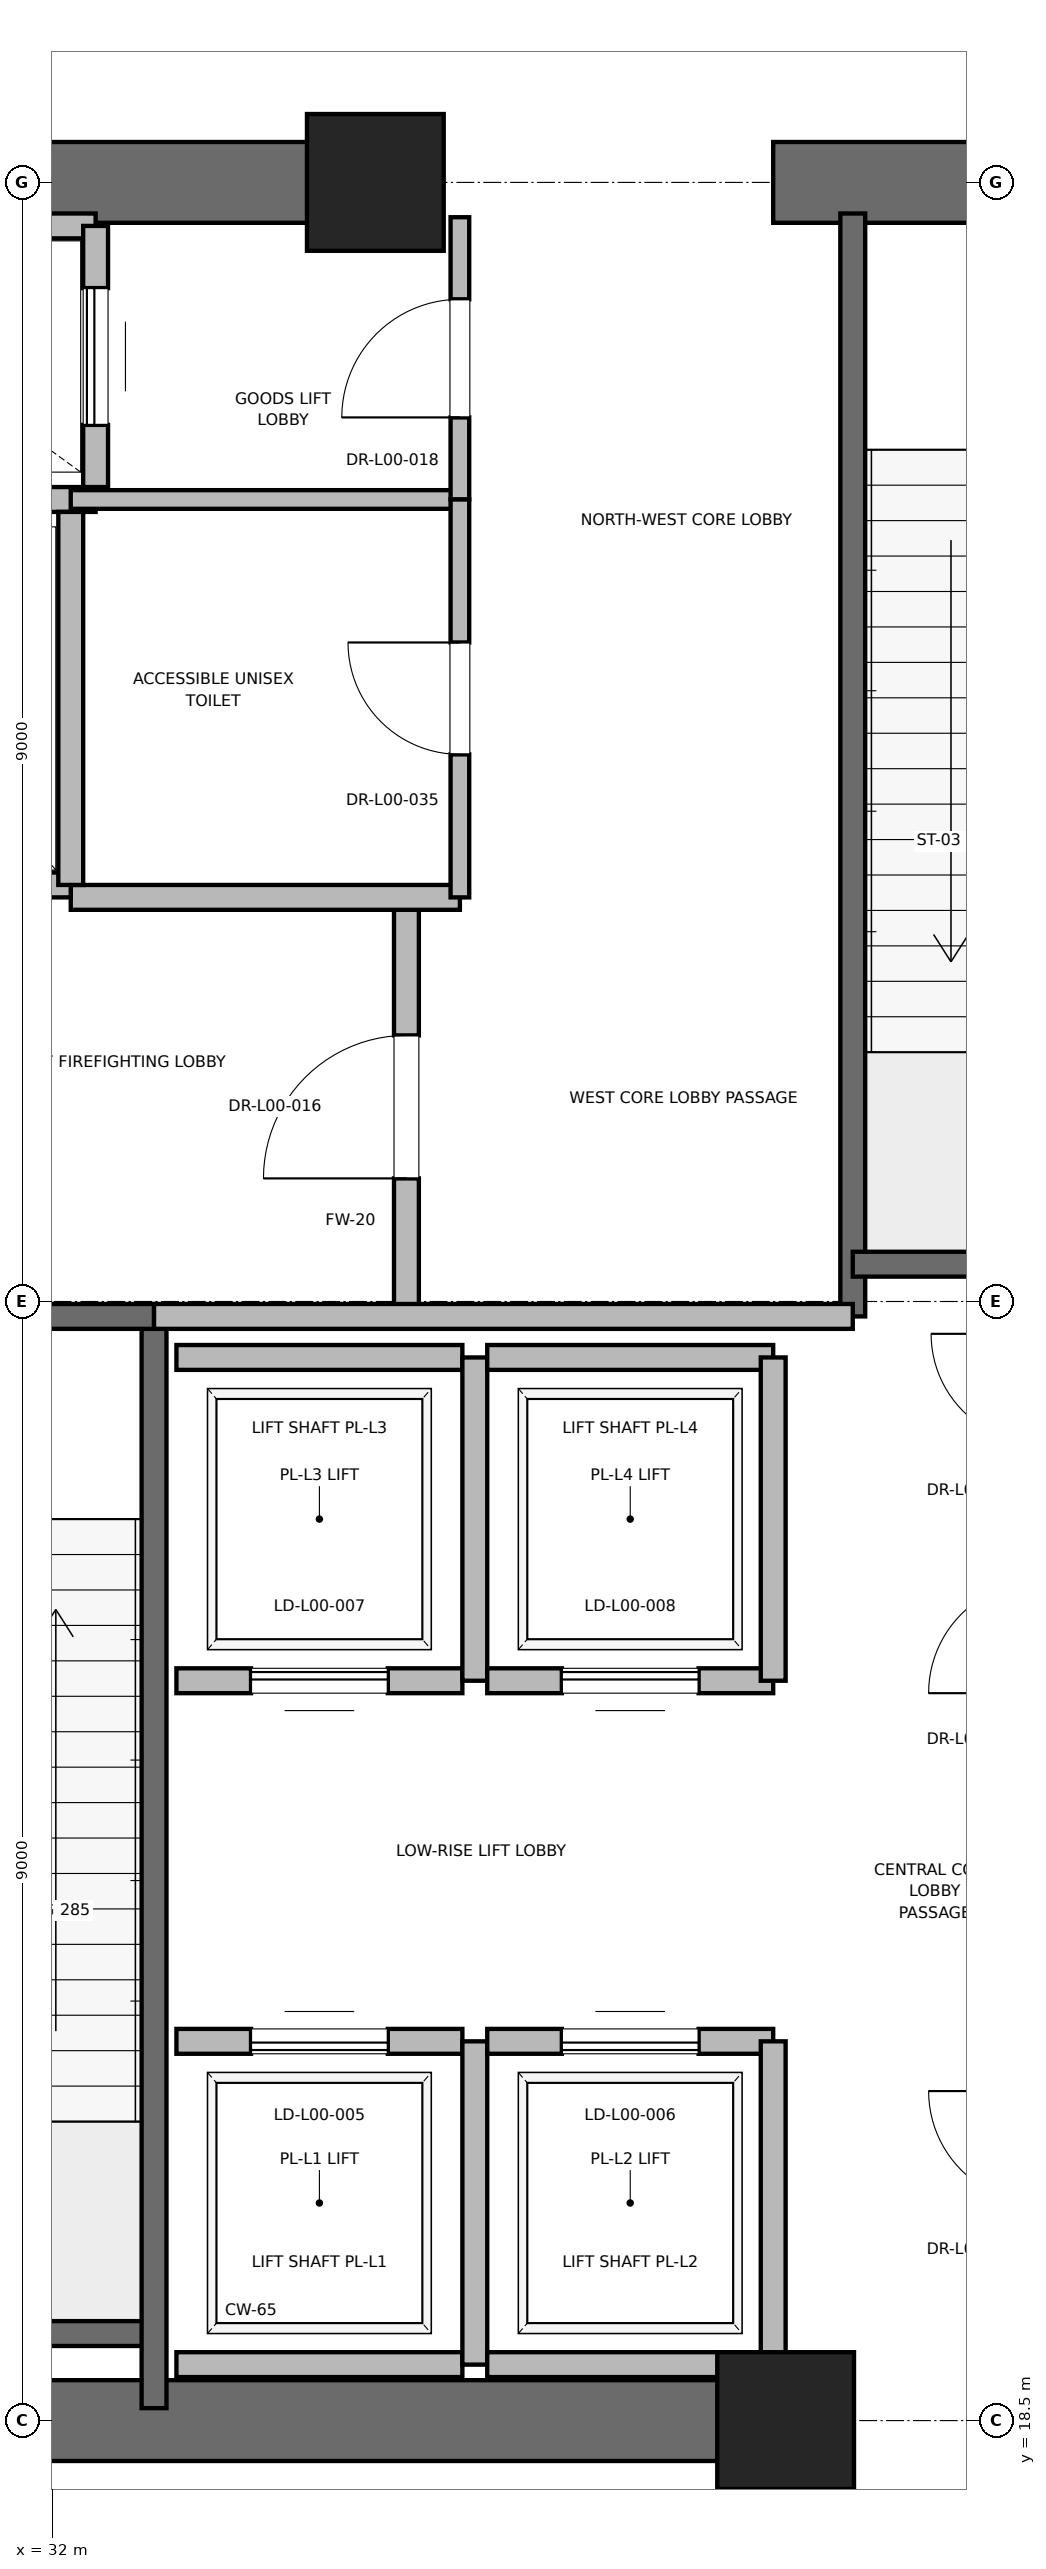
"""IFC4 building model, lengths in metres.
Left out: names, types, materials, properties, quantities, classifications, styles, units other than length and angle.
Written with IfcOpenShell. Run it as: python <this file> out.ifc"""

import sys

from ifc_helpers import new_model, si_unit, direction, frame, frame_2d, origin, origin_2d, place, context, subcontext, project, spatial, rectangle, extrude, element, fill, save


model = new_model("IFC4")
c1 = context("Model", 3, precision=1e-05, world=origin(), true_north=direction((0.0, 1.0)))
c2 = subcontext(c1, "Body", "Model", "MODEL_VIEW")
j1 = project(units=[si_unit("LENGTHUNIT", "METRE"), si_unit("PLANEANGLEUNIT", "RADIAN")], contexts=[c1])
p1 = place(None, origin())
s1 = spatial("IfcSite", under=j1, at=p1, CompositionType="ELEMENT")
p2 = place(p1, origin())
s2 = spatial("IfcBuilding", under=s1, at=p2, CompositionType="ELEMENT")
p3 = place(p2, origin())
s3 = spatial("IfcBuildingStorey", under=s2, at=p3, CompositionType="ELEMENT", Elevation=0.0)
for number, where, z_axis, x_axis in (
    (1, (37.9, 18.5, 0.0), (0.0, 0.0, 1.0), (1.0, 0.0, 0.0)),
    (2, (34.6, 36.5, 0.0), (0.0, 0.0, 1.0), (1.0, 0.0, 0.0)),
):
    element("IfcColumn", number, at=place(p3, frame(where, z_axis=z_axis, x_axis=x_axis)), inside=s3, PredefinedType="PILASTER", context=c2, shape_type="SweptSolid", body=[
        extrude(rectangle(XDim=1.1, YDim=1.1, at=origin_2d()), origin(), (0.0, 0.0, 1.0), 6.0),
    ])
p4 = place(p3, frame((29.0, 18.5, 0.0), z_axis=(0.0, 0.0, 1.0), x_axis=(1.0, 0.0, 0.0)))
e3 = element("IfcWall", 3, at=p4, inside=s3, PredefinedType="SHEAR", context=c2, shape_type="SweptSolid", body=[
    extrude(rectangle(XDim=9.2, YDim=0.65, at=frame_2d((4.6, 0.0))), origin(), (0.0, 0.0, 1.0), 5.72),
])
p5 = place(p3, frame((29.0, 36.5, 0.0), z_axis=(0.0, 0.0, 1.0), x_axis=(1.0, 0.0, 0.0)))
e4 = element("IfcWall", 4, at=p5, inside=s3, PredefinedType="SHEAR", context=c2, shape_type="SweptSolid", body=[
    extrude(rectangle(XDim=5.8, YDim=0.65, at=frame_2d((2.9, 0.0))), origin(), (0.0, 0.0, 1.0), 5.72),
])
p6 = place(p3, frame((37.8, 36.5, 0.0), z_axis=(0.0, 0.0, 1.0), x_axis=(1.0, 0.0, 0.0)))
e5 = element("IfcWall", 5, at=p6, inside=s3, PredefinedType="SHEAR", context=c2, shape_type="SweptSolid", body=[
    extrude(rectangle(XDim=4.4, YDim=0.65, at=frame_2d((2.2, 0.0))), origin(), (0.0, 0.0, 1.0), 5.72),
])
p7 = place(p6, frame((1.65, 0.0, 0.0)))
e6 = element("IfcOpeningElement", 6, at=p7, cuts=e5, PredefinedType="OPENING", context=c2, shape_type="SweptSolid", body=[
    extrude(rectangle(XDim=1.1, YDim=2.15, at=frame_2d((0.55, 1.075))), frame((0.0, 0.325, 0.0), z_axis=(0.0, -1.0, 0.0), x_axis=(1.0, 0.0, 0.0)), (0.0, 0.0, 1.0), 0.65),
])
p8 = place(p3, frame((29.7, 19.2, 0.0), z_axis=(0.0, 0.0, 1.0), x_axis=(1.0, 0.0, 0.0)))
e7 = element("IfcWall", 7, at=p8, inside=s3, PredefinedType="SOLIDWALL", context=c2, shape_type="SweptSolid", body=[
    extrude(rectangle(XDim=3.12, YDim=0.2, at=frame_2d((1.56, 0.0))), origin(), (0.0, 0.0, 1.0), 5.72),
])
p9 = place(p3, frame((32.82, 18.6, 0.0), z_axis=(0.0, 0.0, 1.0), x_axis=(0.0, 1.0, 0.0)))
e8 = element("IfcWall", 8, at=p9, inside=s3, PredefinedType="SOLIDWALL", context=c2, shape_type="SweptSolid", body=[
    extrude(rectangle(XDim=8.78, YDim=0.2, at=frame_2d((4.39, 0.0))), origin(), (0.0, 0.0, 1.0), 5.72),
])
p10 = place(p3, frame((29.7, 27.38, 0.0), z_axis=(0.0, 0.0, 1.0), x_axis=(1.0, 0.0, 0.0)))
e9 = element("IfcWall", 9, at=p10, inside=s3, PredefinedType="SOLIDWALL", context=c2, shape_type="SweptSolid", body=[
    extrude(rectangle(XDim=3.12, YDim=0.2, at=frame_2d((1.56, 0.0))), origin(), (0.0, 0.0, 1.0), 5.72),
])
p11 = place(p10, frame((1.01, 0.0, 0.0)))
e10 = element("IfcOpeningElement", 10, at=p11, cuts=e9, PredefinedType="OPENING", context=c2, shape_type="SweptSolid", body=[
    extrude(rectangle(XDim=1.1, YDim=2.15, at=frame_2d((0.55, 1.075))), frame((0.0, 0.1, 0.0), z_axis=(0.0, -1.0, 0.0), x_axis=(1.0, 0.0, 0.0)), (0.0, 0.0, 1.0), 0.2),
])
p12 = place(p3, frame((38.44, 27.38, 0.0), z_axis=(0.0, 0.0, 1.0), x_axis=(0.0, 1.0, 0.0)))
e11 = element("IfcWall", 11, at=p12, inside=s3, PredefinedType="SOLIDWALL", context=c2, shape_type="SweptSolid", body=[
    extrude(rectangle(XDim=8.87, YDim=0.2, at=frame_2d((4.435, 0.0))), origin(), (0.0, 0.0, 1.0), 5.72),
])
p13 = place(p3, frame((38.44, 27.8, 0.0), z_axis=(0.0, 0.0, 1.0), x_axis=(1.0, 0.0, 0.0)))
e12 = element("IfcWall", 12, at=p13, inside=s3, PredefinedType="SOLIDWALL", context=c2, shape_type="SweptSolid", body=[
    extrude(rectangle(XDim=3.32, YDim=0.2, at=frame_2d((1.66, 0.0))), origin(), (0.0, 0.0, 1.0), 5.72),
])
p14 = place(p3, frame((34.85, 27.38, 0.0), z_axis=(0.0, 0.0, 1.0), x_axis=(0.0, 1.0, 0.0)))
e13 = element("IfcWall", 13, at=p14, inside=s3, PredefinedType="PARTITIONING", context=c2, shape_type="SweptSolid", body=[
    extrude(rectangle(XDim=3.37, YDim=0.2, at=frame_2d((1.685, 0.0))), origin(), (0.0, 0.0, 1.0), 5.72),
])
p15 = place(p14, frame((1.11, 0.0, 0.0)))
e14 = element("IfcOpeningElement", 14, at=p15, cuts=e13, PredefinedType="OPENING", context=c2, shape_type="SweptSolid", body=[
    extrude(rectangle(XDim=1.15, YDim=2.2, at=frame_2d((0.575, 1.1))), frame((0.0, 0.1, 0.0), z_axis=(0.0, -1.0, 0.0), x_axis=(1.0, 0.0, 0.0)), (0.0, 0.0, 1.0), 0.2),
])
p16 = place(p3, frame((32.82, 27.38, 0.0), z_axis=(0.0, 0.0, 1.0), x_axis=(1.0, 0.0, 0.0)))
e15 = element("IfcWall", 15, at=p16, inside=s3, PredefinedType="PARTITIONING", context=c2, shape_type="SweptSolid", body=[
    extrude(rectangle(XDim=5.62, YDim=0.2, at=frame_2d((2.81, 0.0))), origin(), (0.0, 0.0, 1.0), 5.72),
])
p17 = place(p3, frame((32.15, 30.75, 0.0), z_axis=(0.0, 0.0, 1.0), x_axis=(1.0, 0.0, 0.0)))
e16 = element("IfcWall", 16, at=p17, inside=s3, PredefinedType="PARTITIONING", context=c2, shape_type="SweptSolid", body=[
    extrude(rectangle(XDim=3.13, YDim=0.2, at=frame_2d((1.565, 0.0))), origin(), (0.0, 0.0, 1.0), 5.72),
])
p18 = place(p3, frame((29.55, 30.85, 0.0), z_axis=(0.0, 0.0, 1.0), x_axis=(1.0, 0.0, 0.0)))
e17 = element("IfcWall", 17, at=p18, inside=s3, PredefinedType="SOLIDWALL", context=c2, shape_type="SweptSolid", body=[
    extrude(rectangle(XDim=2.6, YDim=0.2, at=frame_2d((1.3, 0.0))), origin(), (0.0, 0.0, 1.0), 4.5),
])
p19 = place(p18, frame((0.75, 0.0, 0.0)))
e18 = element("IfcOpeningElement", 18, at=p19, cuts=e17, PredefinedType="OPENING", context=c2, shape_type="SweptSolid", body=[
    extrude(rectangle(XDim=1.1, YDim=2.2, at=frame_2d((0.55, 1.1))), frame((0.0, 0.1, 0.0), z_axis=(0.0, -1.0, 0.0), x_axis=(1.0, 0.0, 0.0)), (0.0, 0.0, 1.0), 0.2),
])
p20 = place(p3, frame((29.55, 33.95, 0.0), z_axis=(0.0, 0.0, 1.0), x_axis=(1.0, 0.0, 0.0)))
e19 = element("IfcWall", 19, at=p20, inside=s3, PredefinedType="SOLIDWALL", context=c2, shape_type="SweptSolid", body=[
    extrude(rectangle(XDim=2.8, YDim=0.2, at=frame_2d((1.4, 0.0))), origin(), (0.0, 0.0, 1.0), 5.72),
])
p21 = place(p3, frame((32.15, 30.85, 0.0), z_axis=(0.0, 0.0, 1.0), x_axis=(0.0, 1.0, 0.0)))
e20 = element("IfcWall", 20, at=p21, inside=s3, PredefinedType="SOLIDWALL", context=c2, shape_type="SweptSolid", body=[
    extrude(rectangle(XDim=3.0, YDim=0.2, at=frame_2d((1.5, 0.0))), origin(), (0.0, 0.0, 1.0), 5.72),
])
p22 = place(p3, frame((32.35, 36.15, 0.0), z_axis=(0.0, 0.0, 1.0), x_axis=(-1.0, 0.0, 0.0)))
e21 = element("IfcWall", 21, at=p22, inside=s3, PredefinedType="SOLIDWALL", context=c2, shape_type="SweptSolid", body=[
    extrude(rectangle(XDim=2.8, YDim=0.2, at=frame_2d((1.4, 0.0))), origin(), (0.0, 0.0, 1.0), 4.779),
])
p23 = place(p3, frame((32.35, 34.05, 0.0), z_axis=(0.0, 0.0, 1.0), x_axis=(0.0, 1.0, 0.0)))
e22 = element("IfcWall", 22, at=p23, inside=s3, PredefinedType="SOLIDWALL", context=c2, shape_type="SweptSolid", body=[
    extrude(rectangle(XDim=2.1, YDim=0.2, at=frame_2d((1.05, 0.0))), origin(), (0.0, 0.0, 1.0), 5.72),
])
p24 = place(p23, frame((0.5, 0.0, 0.0)))
e23 = element("IfcOpeningElement", 23, at=p24, cuts=e22, PredefinedType="OPENING", context=c2, shape_type="SweptSolid", body=[
    extrude(rectangle(XDim=1.1, YDim=2.2, at=frame_2d((0.55, 1.1))), frame((0.0, 0.1, 0.0), z_axis=(0.0, -1.0, 0.0), x_axis=(1.0, 0.0, 0.0)), (0.0, 0.0, 1.0), 0.2),
])
p25 = place(p3, frame((33.0, 18.95, 0.0), z_axis=(0.0, 0.0, 1.0), x_axis=(1.0, 0.0, 0.0)))
e24 = element("IfcWall", 24, at=p25, inside=s3, PredefinedType="SOLIDWALL", context=c2, shape_type="SweptSolid", body=[
    extrude(rectangle(XDim=2.3, YDim=0.2, at=frame_2d((1.15, 0.0))), origin(), (0.0, 0.0, 1.0), 5.72),
])
p26 = place(p3, frame((35.3, 21.55, 0.0), z_axis=(0.0, 0.0, 1.0), x_axis=(-1.0, 0.0, 0.0)))
e25 = element("IfcWall", 25, at=p26, inside=s3, PredefinedType="SOLIDWALL", context=c2, shape_type="SweptSolid", body=[
    extrude(rectangle(XDim=2.3, YDim=0.2, at=frame_2d((1.15, 0.0))), origin(), (0.0, 0.0, 1.0), 5.72),
])
p27 = place(p26, frame((0.6, 0.0, 0.0)))
e26 = element("IfcOpeningElement", 26, at=p27, cuts=e25, PredefinedType="OPENING", context=c2, shape_type="SweptSolid", body=[
    extrude(rectangle(XDim=1.1, YDim=2.2, at=frame_2d((0.55, 1.1))), frame((0.0, 0.1, 0.0), z_axis=(0.0, -1.0, 0.0), x_axis=(1.0, 0.0, 0.0)), (0.0, 0.0, 1.0), 0.2),
])
p28 = place(p3, frame((35.4, 18.95, 0.0), z_axis=(0.0, 0.0, 1.0), x_axis=(0.0, 1.0, 0.0)))
e27 = element("IfcWall", 27, at=p28, inside=s3, PredefinedType="SOLIDWALL", context=c2, shape_type="SweptSolid", body=[
    extrude(rectangle(XDim=2.6, YDim=0.2, at=frame_2d((1.3, 0.0))), origin(), (0.0, 0.0, 1.0), 5.72),
])
p29 = place(p3, frame((35.5, 18.95, 0.0), z_axis=(0.0, 0.0, 1.0), x_axis=(1.0, 0.0, 0.0)))
e28 = element("IfcWall", 28, at=p29, inside=s3, PredefinedType="SOLIDWALL", context=c2, shape_type="SweptSolid", body=[
    extrude(rectangle(XDim=2.3, YDim=0.2, at=frame_2d((1.15, 0.0))), origin(), (0.0, 0.0, 1.0), 4.5),
])
p30 = place(p3, frame((37.8, 21.55, 0.0), z_axis=(0.0, 0.0, 1.0), x_axis=(-1.0, 0.0, 0.0)))
e29 = element("IfcWall", 29, at=p30, inside=s3, PredefinedType="SOLIDWALL", context=c2, shape_type="SweptSolid", body=[
    extrude(rectangle(XDim=2.3, YDim=0.2, at=frame_2d((1.15, 0.0))), origin(), (0.0, 0.0, 1.0), 5.72),
])
p31 = place(p30, frame((0.6, 0.0, 0.0)))
e30 = element("IfcOpeningElement", 30, at=p31, cuts=e29, PredefinedType="OPENING", context=c2, shape_type="SweptSolid", body=[
    extrude(rectangle(XDim=1.1, YDim=2.2, at=frame_2d((0.55, 1.1))), frame((0.0, 0.1, 0.0), z_axis=(0.0, -1.0, 0.0), x_axis=(1.0, 0.0, 0.0)), (0.0, 0.0, 1.0), 0.2),
])
p32 = place(p3, frame((37.8, 18.95, 0.0), z_axis=(0.0, 0.0, 1.0), x_axis=(0.0, 1.0, 0.0)))
e31 = element("IfcWall", 31, at=p32, inside=s3, PredefinedType="SOLIDWALL", context=c2, shape_type="SweptSolid", body=[
    extrude(rectangle(XDim=2.6, YDim=0.2, at=frame_2d((1.3, 0.0))), origin(), (0.0, 0.0, 1.0), 4.5),
])
p33 = place(p3, frame((33.0, 24.45, 0.0), z_axis=(0.0, 0.0, 1.0), x_axis=(1.0, 0.0, 0.0)))
e32 = element("IfcWall", 32, at=p33, inside=s3, PredefinedType="SOLIDWALL", context=c2, shape_type="SweptSolid", body=[
    extrude(rectangle(XDim=2.3, YDim=0.2, at=frame_2d((1.15, 0.0))), origin(), (0.0, 0.0, 1.0), 5.72),
])
p34 = place(p33, frame((0.6, 0.0, 0.0)))
e33 = element("IfcOpeningElement", 33, at=p34, cuts=e32, PredefinedType="OPENING", context=c2, shape_type="SweptSolid", body=[
    extrude(rectangle(XDim=1.1, YDim=2.2, at=frame_2d((0.55, 1.1))), frame((0.0, 0.1, 0.0), z_axis=(0.0, -1.0, 0.0), x_axis=(1.0, 0.0, 0.0)), (0.0, 0.0, 1.0), 0.2),
])
p35 = place(p3, frame((35.3, 27.05, 0.0), z_axis=(0.0, 0.0, 1.0), x_axis=(-1.0, 0.0, 0.0)))
e34 = element("IfcWall", 34, at=p35, inside=s3, PredefinedType="SOLIDWALL", context=c2, shape_type="SweptSolid", body=[
    extrude(rectangle(XDim=2.3, YDim=0.2, at=frame_2d((1.15, 0.0))), origin(), (0.0, 0.0, 1.0), 5.72),
])
p36 = place(p3, frame((35.4, 24.45, 0.0), z_axis=(0.0, 0.0, 1.0), x_axis=(0.0, 1.0, 0.0)))
e35 = element("IfcWall", 35, at=p36, inside=s3, PredefinedType="SOLIDWALL", context=c2, shape_type="SweptSolid", body=[
    extrude(rectangle(XDim=2.6, YDim=0.2, at=frame_2d((1.3, 0.0))), origin(), (0.0, 0.0, 1.0), 5.72),
])
p37 = place(p3, frame((35.5, 24.45, 0.0), z_axis=(0.0, 0.0, 1.0), x_axis=(1.0, 0.0, 0.0)))
e36 = element("IfcWall", 36, at=p37, inside=s3, PredefinedType="SOLIDWALL", context=c2, shape_type="SweptSolid", body=[
    extrude(rectangle(XDim=2.3, YDim=0.2, at=frame_2d((1.15, 0.0))), origin(), (0.0, 0.0, 1.0), 5.72),
])
p38 = place(p37, frame((0.6, 0.0, 0.0)))
e37 = element("IfcOpeningElement", 37, at=p38, cuts=e36, PredefinedType="OPENING", context=c2, shape_type="SweptSolid", body=[
    extrude(rectangle(XDim=1.1, YDim=2.2, at=frame_2d((0.55, 1.1))), frame((0.0, 0.1, 0.0), z_axis=(0.0, -1.0, 0.0), x_axis=(1.0, 0.0, 0.0)), (0.0, 0.0, 1.0), 0.2),
])
p39 = place(p3, frame((37.8, 27.05, 0.0), z_axis=(0.0, 0.0, 1.0), x_axis=(-1.0, 0.0, 0.0)))
e38 = element("IfcWall", 38, at=p39, inside=s3, PredefinedType="SOLIDWALL", context=c2, shape_type="SweptSolid", body=[
    extrude(rectangle(XDim=2.3, YDim=0.2, at=frame_2d((1.15, 0.0))), origin(), (0.0, 0.0, 1.0), 5.72),
])
p40 = place(p3, frame((37.8, 24.45, 0.0), z_axis=(0.0, 0.0, 1.0), x_axis=(0.0, 1.0, 0.0)))
e39 = element("IfcWall", 39, at=p40, inside=s3, PredefinedType="SOLIDWALL", context=c2, shape_type="SweptSolid", body=[
    extrude(rectangle(XDim=2.6, YDim=0.2, at=frame_2d((1.3, 0.0))), origin(), (0.0, 0.0, 1.0), 5.72),
])
p41 = place(p3, frame((32.15, 33.95, 0.0), z_axis=(0.0, 0.0, 1.0), x_axis=(1.0, 0.0, 0.0)))
e40 = element("IfcWall", 40, at=p41, inside=s3, PredefinedType="PARTITIONING", context=c2, shape_type="SweptSolid", body=[
    extrude(rectangle(XDim=3.13, YDim=0.15, at=frame_2d((1.565, 0.0))), origin(), (0.0, 0.0, 1.0), 2.85),
])
p42 = place(p3, frame((35.28, 33.95, 0.0), z_axis=(0.0, 0.0, 1.0), x_axis=(0.0, 1.0, 0.0)))
e41 = element("IfcWall", 41, at=p42, inside=s3, PredefinedType="PARTITIONING", context=c2, shape_type="SweptSolid", body=[
    extrude(rectangle(XDim=2.27, YDim=0.15, at=frame_2d((1.135, 0.0))), origin(), (0.0, 0.0, 1.0), 2.85),
])
p43 = place(p42, frame((0.66, 0.0, 0.0)))
e42 = element("IfcOpeningElement", 42, at=p43, cuts=e41, PredefinedType="OPENING", context=c2, shape_type="SweptSolid", body=[
    extrude(rectangle(XDim=0.95, YDim=2.15, at=frame_2d((0.475, 1.075))), frame((0.0, 0.075, 0.0), z_axis=(0.0, -1.0, 0.0), x_axis=(1.0, 0.0, 0.0)), (0.0, 0.0, 1.0), 0.15),
])
p44 = place(p3, frame((35.28, 30.75, 0.0), z_axis=(0.0, 0.0, 1.0), x_axis=(0.0, 1.0, 0.0)))
e43 = element("IfcWall", 43, at=p44, inside=s3, PredefinedType="PARTITIONING", context=c2, shape_type="SweptSolid", body=[
    extrude(rectangle(XDim=3.2, YDim=0.15, at=frame_2d((1.6, 0.0))), origin(), (0.0, 0.0, 1.0), 2.85),
])
p45 = place(p44, frame((1.15, 0.0, 0.0)))
e44 = element("IfcOpeningElement", 44, at=p45, cuts=e43, PredefinedType="OPENING", context=c2, shape_type="SweptSolid", body=[
    extrude(rectangle(XDim=0.9, YDim=2.1, at=frame_2d((0.45, 1.05))), frame((0.0, 0.075, 0.0), z_axis=(0.0, -1.0, 0.0), x_axis=(1.0, 0.0, 0.0)), (0.0, 0.0, 1.0), 0.15),
])
p46 = place(p15, origin())
e45 = element("IfcDoor", 45, at=p46, inside=s3, OperationType="SINGLE_SWING_LEFT", PredefinedType="DOOR", context=c2, shape_type="SweptSolid", body=[
    extrude(rectangle(XDim=1.15, YDim=2.2, at=frame_2d((0.575, 1.1))), frame((0.0, 0.025, 0.0), z_axis=(0.0, -1.0, 0.0), x_axis=(1.0, 0.0, 0.0)), (0.0, 0.0, 1.0), 0.05),
])
fill(e14, e45)
p47 = place(p24, origin())
e46 = element("IfcDoor", 46, at=p47, inside=s3, OperationType="SLIDING_TO_RIGHT", PredefinedType="DOOR", context=c2, shape_type="SweptSolid", body=[
    extrude(rectangle(XDim=1.1, YDim=2.2, at=frame_2d((0.55, 1.1))), frame((0.0, 0.025, 0.0), z_axis=(0.0, -1.0, 0.0), x_axis=(1.0, 0.0, 0.0)), (0.0, 0.0, 1.0), 0.05),
])
fill(e23, e46)
p48 = place(p27, origin())
e47 = element("IfcDoor", 47, at=p48, inside=s3, OperationType="SLIDING_TO_RIGHT", PredefinedType="DOOR", context=c2, shape_type="SweptSolid", body=[
    extrude(rectangle(XDim=1.1, YDim=2.2, at=frame_2d((0.55, 1.1))), frame((0.0, 0.025, 0.0), z_axis=(0.0, -1.0, 0.0), x_axis=(1.0, 0.0, 0.0)), (0.0, 0.0, 1.0), 0.05),
])
fill(e26, e47)
p49 = place(p31, origin())
e48 = element("IfcDoor", 48, at=p49, inside=s3, OperationType="SLIDING_TO_RIGHT", PredefinedType="DOOR", context=c2, shape_type="SweptSolid", body=[
    extrude(rectangle(XDim=1.1, YDim=2.2, at=frame_2d((0.55, 1.1))), frame((0.0, 0.025, 0.0), z_axis=(0.0, -1.0, 0.0), x_axis=(1.0, 0.0, 0.0)), (0.0, 0.0, 1.0), 0.05),
])
fill(e30, e48)
p50 = place(p34, origin())
e49 = element("IfcDoor", 49, at=p50, inside=s3, OperationType="SLIDING_TO_RIGHT", PredefinedType="DOOR", context=c2, shape_type="SweptSolid", body=[
    extrude(rectangle(XDim=1.1, YDim=2.2, at=frame_2d((0.55, 1.1))), frame((0.0, 0.025, 0.0), z_axis=(0.0, -1.0, 0.0), x_axis=(1.0, 0.0, 0.0)), (0.0, 0.0, 1.0), 0.05),
])
fill(e33, e49)
p51 = place(p38, origin())
e50 = element("IfcDoor", 50, at=p51, inside=s3, OperationType="SLIDING_TO_RIGHT", PredefinedType="DOOR", context=c2, shape_type="SweptSolid", body=[
    extrude(rectangle(XDim=1.1, YDim=2.2, at=frame_2d((0.55, 1.1))), frame((0.0, 0.025, 0.0), z_axis=(0.0, -1.0, 0.0), x_axis=(1.0, 0.0, 0.0)), (0.0, 0.0, 1.0), 0.05),
])
fill(e37, e50)
p52 = place(p43, origin())
e51 = element("IfcDoor", 51, at=p52, inside=s3, OperationType="SINGLE_SWING_LEFT", PredefinedType="DOOR", context=c2, shape_type="SweptSolid", body=[
    extrude(rectangle(XDim=0.95, YDim=2.15, at=frame_2d((0.475, 1.075))), frame((0.0, 0.025, 0.0), z_axis=(0.0, -1.0, 0.0), x_axis=(1.0, 0.0, 0.0)), (0.0, 0.0, 1.0), 0.05),
])
fill(e42, e51)
p53 = place(p45, origin())
e52 = element("IfcDoor", 52, at=p53, inside=s3, OperationType="SINGLE_SWING_RIGHT", PredefinedType="DOOR", context=c2, shape_type="SweptSolid", body=[
    extrude(rectangle(XDim=0.9, YDim=2.1, at=frame_2d((0.45, 1.05))), frame((0.0, 0.025, 0.0), z_axis=(0.0, -1.0, 0.0), x_axis=(1.0, 0.0, 0.0)), (0.0, 0.0, 1.0), 0.05),
])
fill(e44, e52)
save(model, sys.argv[1])
